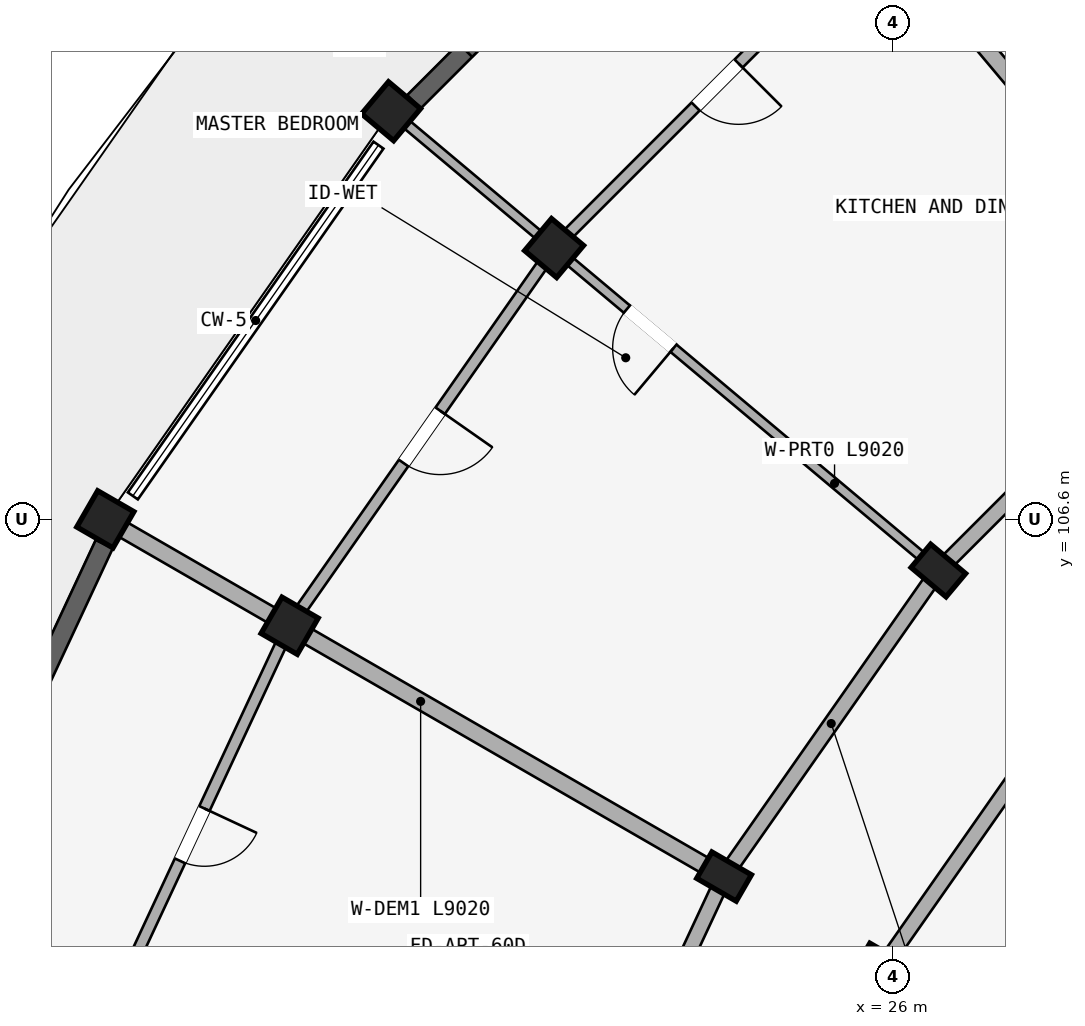
"""IFC4 building model, lengths in metres.
Left out: names, types, materials, properties, quantities, classifications, styles, units other than length and angle.
Written with IfcOpenShell. Run it as: python <this file> out.ifc"""

import sys

from ifc_helpers import new_model, si_unit, direction, frame, frame_2d, origin, origin_2d, place, context, subcontext, project, spatial, rectangle, extrude, element, fill, save


model = new_model("IFC4")
c1 = context("Model", 3, precision=1e-05, world=origin(), true_north=direction((0.0, 1.0)))
c2 = subcontext(c1, "Body", "Model", "MODEL_VIEW")
j1 = project(units=[si_unit("LENGTHUNIT", "METRE"), si_unit("PLANEANGLEUNIT", "RADIAN")], contexts=[c1])
p1 = place(None, origin())
s1 = spatial("IfcSite", under=j1, at=p1, CompositionType="ELEMENT")
p2 = place(p1, origin())
s2 = spatial("IfcBuilding", under=s1, at=p2, CompositionType="ELEMENT")
p3 = place(p2, frame((0.0, 0.0, 46.5)))
s3 = spatial("IfcBuildingStorey", under=s2, at=p3, CompositionType="ELEMENT", Elevation=46.5)
p4 = place(p3, frame((26.598, 105.927, 0.0), z_axis=(0.0, 0.0, 1.0), x_axis=(0.642787609687, 0.766044443119, 0.0)))
e1 = element("IfcColumn", 1, at=p4, inside=s3, PredefinedType="COLUMN", context=c2, shape_type="SweptSolid", body=[
    extrude(rectangle(XDim=0.4, YDim=0.6, at=origin_2d()), origin(), (0.0, 0.0, 1.0), 2.93),
])
p5 = place(p3, frame((21.542, 110.169, 0.0), z_axis=(0.0, 0.0, 1.0), x_axis=(0.642787609687, 0.766044443119, 0.0)))
e2 = element("IfcColumn", 2, at=p5, inside=s3, PredefinedType="COLUMN", context=c2, shape_type="SweptSolid", body=[
    extrude(rectangle(XDim=0.55, YDim=0.55, at=origin_2d()), origin(), (0.0, 0.0, 1.0), 2.93),
])
p6 = place(p3, frame((19.397, 111.969, 0.0), z_axis=(0.0, 0.0, 1.0), x_axis=(0.642787609687, 0.766044443119, 0.0)))
e3 = element("IfcColumn", 3, at=p6, inside=s3, PredefinedType="COLUMN", context=c2, shape_type="SweptSolid", body=[
    extrude(rectangle(XDim=0.55, YDim=0.55, at=origin_2d()), origin(), (0.0, 0.0, 1.0), 2.97),
])
for number, where, z_axis, x_axis in (
    (4, (25.856, 100.7, 0.0), (0.0, 0.0, 1.0), (0.5, 0.866, 0.0)),
    (5, (23.778, 101.9, 0.0), (0.0, 0.0, 1.0), (0.5, 0.866, 0.0)),
):
    element("IfcColumn", number, at=place(p3, frame(where, z_axis=z_axis, x_axis=x_axis)), inside=s3, PredefinedType="COLUMN", context=c2, shape_type="SweptSolid", body=[
        extrude(rectangle(XDim=0.4, YDim=0.6, at=origin_2d()), origin(), (0.0, 0.0, 1.0), 2.93),
    ])
p7 = place(p3, frame((18.062, 105.2, 0.0), z_axis=(0.0, 0.0, 1.0), x_axis=(0.5, 0.866025403784, 0.0)))
e6 = element("IfcColumn", 6, at=p7, inside=s3, PredefinedType="COLUMN", context=c2, shape_type="SweptSolid", body=[
    extrude(rectangle(XDim=0.55, YDim=0.55, at=origin_2d()), origin(), (0.0, 0.0, 1.0), 2.93),
])
p8 = place(p3, frame((15.637, 106.6, 0.0), z_axis=(0.0, 0.0, 1.0), x_axis=(0.5, 0.866025403784, 0.0)))
e7 = element("IfcColumn", 7, at=p8, inside=s3, PredefinedType="COLUMN", context=c2, shape_type="SweptSolid", body=[
    extrude(rectangle(XDim=0.55, YDim=0.55, at=origin_2d()), origin(), (0.0, 0.0, 1.0), 2.97),
])
p9 = place(p3, frame((30.073, 109.402, 0.0), z_axis=(0.0, 0.0, 1.0), x_axis=(-0.707106781187, -0.707106781187, 0.0)))
e8 = element("IfcWall", 8, at=p9, inside=s3, PredefinedType="STANDARD", context=c2, shape_type="SweptSolid", body=[
    extrude(rectangle(XDim=4.916, YDim=0.2, at=frame_2d((2.458, 0.0))), origin(), (0.0, 0.0, 1.0), 2.372),
])
p10 = place(p9, frame((1.918, 0.0, 0.0)))
e9 = element("IfcOpeningElement", 9, at=p10, cuts=e8, PredefinedType="OPENING", context=c2, shape_type="SweptSolid", body=[
    extrude(rectangle(XDim=1.08, YDim=2.15, at=frame_2d((0.54, 1.075))), frame((0.0, 0.11, 0.0), z_axis=(0.0, -1.0, 0.0), x_axis=(1.0, 0.0, 0.0)), (0.0, 0.0, 1.0), 0.22),
])
p11 = place(p3, frame((28.436, 104.384, 0.0), z_axis=(0.0, 0.0, 1.0), x_axis=(-0.573571637217, -0.819155404658, 0.0)))
e10 = element("IfcWall", 10, at=p11, inside=s3, PredefinedType="STANDARD", context=c2, shape_type="SweptSolid", body=[
    extrude(rectangle(XDim=4.497, YDim=0.2, at=frame_2d((2.249, 0.0))), origin(), (0.0, 0.0, 1.0), 2.372),
])
p12 = place(p3, frame((26.598, 105.927, 0.0), z_axis=(0.0, 0.0, 1.0), x_axis=(-0.573592335331, -0.819140911474, 0.0)))
e11 = element("IfcWall", 11, at=p12, inside=s3, PredefinedType="STANDARD", context=c2, shape_type="SweptSolid", body=[
    extrude(rectangle(XDim=4.916, YDim=0.2, at=frame_2d((2.458, 0.0))), origin(), (0.0, 0.0, 1.0), 2.372),
])
p13 = place(p3, frame((23.778, 101.9, 0.0), z_axis=(0.0, 0.0, 1.0), x_axis=(-0.422629854778, -0.906302381024, 0.0)))
e12 = element("IfcWall", 12, at=p13, inside=s3, PredefinedType="STANDARD", context=c2, shape_type="SweptSolid", body=[
    extrude(rectangle(XDim=4.915, YDim=0.2, at=frame_2d((2.458, 0.0))), origin(), (0.0, 0.0, 1.0), 2.372),
])
p14 = place(p13, frame((1.888, 0.0, 0.0)))
e13 = element("IfcOpeningElement", 13, at=p14, cuts=e12, PredefinedType="OPENING", context=c2, shape_type="SweptSolid", body=[
    extrude(rectangle(XDim=1.14, YDim=2.15, at=frame_2d((0.57, 1.075))), frame((0.0, 0.11, 0.0), z_axis=(0.0, -1.0, 0.0), x_axis=(1.0, 0.0, 0.0)), (0.0, 0.0, 1.0), 0.22),
])
p15 = place(p3, frame((30.009, 109.479, 0.0), z_axis=(0.0, 0.0, 1.0), x_axis=(-0.642784468535, 0.766047078847, 0.0)))
e14 = element("IfcWall", 14, at=p15, inside=s3, PredefinedType="STANDARD", context=c2, shape_type="SweptSolid", body=[
    extrude(rectangle(XDim=9.02, YDim=0.22, at=frame_2d((4.51, 0.0))), origin(), (0.0, 0.0, 1.0), 2.372),
])
p16 = place(p3, frame((26.521, 105.991, 0.0), z_axis=(0.0, 0.0, 1.0), x_axis=(-0.766047078847, 0.642784468535, 0.0)))
e15 = element("IfcWall", 15, at=p16, inside=s3, PredefinedType="PARTITIONING", context=c2, shape_type="SweptSolid", body=[
    extrude(rectangle(XDim=9.02, YDim=0.125, at=frame_2d((4.51, 0.0))), origin(), (0.0, 0.0, 1.0), 2.372),
])
p17 = place(p16, frame((4.45, 0.0, 0.0)))
e16 = element("IfcOpeningElement", 16, at=p17, cuts=e15, PredefinedType="OPENING", context=c2, shape_type="SweptSolid", body=[
    extrude(rectangle(XDim=0.8, YDim=2.1, at=frame_2d((0.4, 1.05))), frame((0.0, 0.073, 0.0), z_axis=(0.0, -1.0, 0.0), x_axis=(1.0, 0.0, 0.0)), (0.0, 0.0, 1.0), 0.145),
])
p18 = place(p3, frame((23.691, 101.95, 0.0), z_axis=(0.0, 0.0, 1.0), x_axis=(-0.866024222538, 0.500002045973, 0.0)))
e17 = element("IfcWall", 17, at=p18, inside=s3, PredefinedType="STANDARD", context=c2, shape_type="SweptSolid", body=[
    extrude(rectangle(XDim=9.02, YDim=0.22, at=frame_2d((4.51, 0.0))), origin(), (0.0, 0.0, 1.0), 2.372),
])
p19 = place(p3, frame((25.831, 114.458, 0.0), z_axis=(0.0, 0.0, 1.0), x_axis=(-0.707106781187, -0.707106781187, 0.0)))
e18 = element("IfcWall", 18, at=p19, inside=s3, PredefinedType="PLUMBINGWALL", context=c2, shape_type="SweptSolid", body=[
    extrude(rectangle(XDim=6.066, YDim=0.15, at=frame_2d((3.033, 0.0))), origin(), (0.0, 0.0, 1.0), 2.372),
])
p20 = place(p19, frame((2.633, 0.0, 0.0)))
e19 = element("IfcOpeningElement", 19, at=p20, cuts=e18, PredefinedType="OPENING", context=c2, shape_type="SweptSolid", body=[
    extrude(rectangle(XDim=0.8, YDim=2.1, at=frame_2d((0.4, 1.05))), frame((0.0, 0.085, 0.0), z_axis=(0.0, -1.0, 0.0), x_axis=(1.0, 0.0, 0.0)), (0.0, 0.0, 1.0), 0.17),
])
p21 = place(p3, frame((21.542, 110.169, 0.0), z_axis=(0.0, 0.0, 1.0), x_axis=(-0.573594691504, -0.81913926159, 0.0)))
e20 = element("IfcWall", 20, at=p21, inside=s3, PredefinedType="PLUMBINGWALL", context=c2, shape_type="SweptSolid", body=[
    extrude(rectangle(XDim=6.066, YDim=0.15, at=frame_2d((3.033, 0.0))), origin(), (0.0, 0.0, 1.0), 2.372),
])
p22 = place(p21, frame((2.613, 0.0, 0.0)))
e21 = element("IfcOpeningElement", 21, at=p22, cuts=e20, PredefinedType="OPENING", context=c2, shape_type="SweptSolid", body=[
    extrude(rectangle(XDim=0.84, YDim=2.1, at=frame_2d((0.42, 1.05))), frame((0.0, 0.085, 0.0), z_axis=(0.0, -1.0, 0.0), x_axis=(1.0, 0.0, 0.0)), (0.0, 0.0, 1.0), 0.17),
])
p23 = place(p3, frame((18.062, 105.2, 0.0), z_axis=(0.0, 0.0, 1.0), x_axis=(-0.42260781991, -0.906312656069, 0.0)))
e22 = element("IfcWall", 22, at=p23, inside=s3, PredefinedType="PLUMBINGWALL", context=c2, shape_type="SweptSolid", body=[
    extrude(rectangle(XDim=6.066, YDim=0.15, at=frame_2d((3.033, 0.0))), origin(), (0.0, 0.0, 1.0), 2.372),
])
p24 = place(p23, frame((2.653, 0.0, 0.0)))
e23 = element("IfcOpeningElement", 23, at=p24, cuts=e22, PredefinedType="OPENING", context=c2, shape_type="SweptSolid", body=[
    extrude(rectangle(XDim=0.76, YDim=2.05, at=frame_2d((0.38, 1.025))), frame((0.0, 0.085, 0.0), z_axis=(0.0, -1.0, 0.0), x_axis=(1.0, 0.0, 0.0)), (0.0, 0.0, 1.0), 0.17),
])
p25 = place(p3, frame((23.907, 116.302, 0.0), z_axis=(0.0, 0.0, 1.0), x_axis=(-0.707106781187, -0.707106781187, 0.0)))
e24 = element("IfcWall", 24, at=p25, inside=s3, PredefinedType="STANDARD", context=c2, shape_type="SweptSolid", body=[
    extrude(rectangle(XDim=5.953, YDim=0.25, at=frame_2d((2.976, 0.0))), origin(), (0.0, 0.0, 1.0), 2.48),
])
p26 = place(p25, frame((3.793, 0.0, 0.38)))
e25 = element("IfcOpeningElement", 25, at=p26, cuts=e24, PredefinedType="OPENING", context=c2, shape_type="SweptSolid", body=[
    extrude(rectangle(XDim=1.2, YDim=1.5, at=frame_2d((0.6, 0.75))), frame((0.0, 0.135, 0.0), z_axis=(0.0, -1.0, 0.0), x_axis=(1.0, 0.0, 0.0)), (0.0, 0.0, 1.0), 0.27),
])
p27 = place(p25, frame((1.484, 0.0, 0.0)))
e26 = element("IfcOpeningElement", 26, at=p27, cuts=e24, PredefinedType="OPENING", context=c2, shape_type="SweptSolid", body=[
    extrude(rectangle(XDim=1.2, YDim=2.15, at=frame_2d((0.6, 1.075))), frame((0.0, 0.135, 0.0), z_axis=(0.0, -1.0, 0.0), x_axis=(1.0, 0.0, 0.0)), (0.0, 0.0, 1.0), 0.27),
])
p28 = place(p3, frame((15.624, 106.275, 0.0), z_axis=(0.0, 0.0, 1.0), x_axis=(-0.422636229619, -0.90629940826, 0.0)))
e27 = element("IfcWall", 27, at=p28, inside=s3, PredefinedType="STANDARD", context=c2, shape_type="SweptSolid", body=[
    extrude(rectangle(XDim=5.953, YDim=0.25, at=frame_2d((2.977, 0.0))), origin(), (0.0, 0.0, 1.0), 2.48),
])
p29 = place(p28, frame((2.076, 0.0, 0.63)))
e28 = element("IfcOpeningElement", 28, at=p29, cuts=e27, PredefinedType="OPENING", context=c2, shape_type="SweptSolid", body=[
    extrude(rectangle(XDim=1.8, YDim=1.65, at=frame_2d((0.9, 0.825))), frame((0.0, 0.135, 0.0), z_axis=(0.0, -1.0, 0.0), x_axis=(1.0, 0.0, 0.0)), (0.0, 0.0, 1.0), 0.27),
])
p30 = place(p17, frame((0.8, 0.0, 0.0), z_axis=(0.0, 0.0, 1.0), x_axis=(-1.0, 0.0, 0.0)))
e29 = element("IfcDoor", 29, at=p30, inside=s3, OperationType="SINGLE_SWING_RIGHT", PredefinedType="DOOR", context=c2, shape_type="SweptSolid", body=[
    extrude(rectangle(XDim=0.8, YDim=2.1, at=frame_2d((0.4, 1.05))), frame((0.0, 0.025, 0.0), z_axis=(0.0, -1.0, 0.0), x_axis=(1.0, 0.0, 0.0)), (0.0, 0.0, 1.0), 0.05),
])
fill(e16, e29)
p31 = place(p20, origin())
e30 = element("IfcDoor", 30, at=p31, inside=s3, OperationType="SINGLE_SWING_LEFT", PredefinedType="DOOR", context=c2, shape_type="SweptSolid", body=[
    extrude(rectangle(XDim=0.8, YDim=2.1, at=frame_2d((0.4, 1.05))), frame((0.0, 0.025, 0.0), z_axis=(0.0, -1.0, 0.0), x_axis=(1.0, 0.0, 0.0)), (0.0, 0.0, 1.0), 0.05),
])
fill(e19, e30)
p32 = place(p22, frame((0.84, 0.0, 0.0), z_axis=(0.0, 0.0, 1.0), x_axis=(-1.0, 0.0, 0.0)))
e31 = element("IfcDoor", 31, at=p32, inside=s3, OperationType="SINGLE_SWING_RIGHT", PredefinedType="DOOR", context=c2, shape_type="SweptSolid", body=[
    extrude(rectangle(XDim=0.84, YDim=2.1, at=frame_2d((0.42, 1.05))), frame((0.0, 0.025, 0.0), z_axis=(0.0, -1.0, 0.0), x_axis=(1.0, 0.0, 0.0)), (0.0, 0.0, 1.0), 0.05),
])
fill(e21, e31)
p33 = place(p24, frame((0.76, 0.0, 0.0), z_axis=(0.0, 0.0, 1.0), x_axis=(-1.0, 0.0, 0.0)))
e32 = element("IfcDoor", 32, at=p33, inside=s3, OperationType="SINGLE_SWING_RIGHT", PredefinedType="DOOR", context=c2, shape_type="SweptSolid", body=[
    extrude(rectangle(XDim=0.76, YDim=2.05, at=frame_2d((0.38, 1.025))), frame((0.0, 0.025, 0.0), z_axis=(0.0, -1.0, 0.0), x_axis=(1.0, 0.0, 0.0)), (0.0, 0.0, 1.0), 0.05),
])
fill(e23, e32)
save(model, sys.argv[1])
